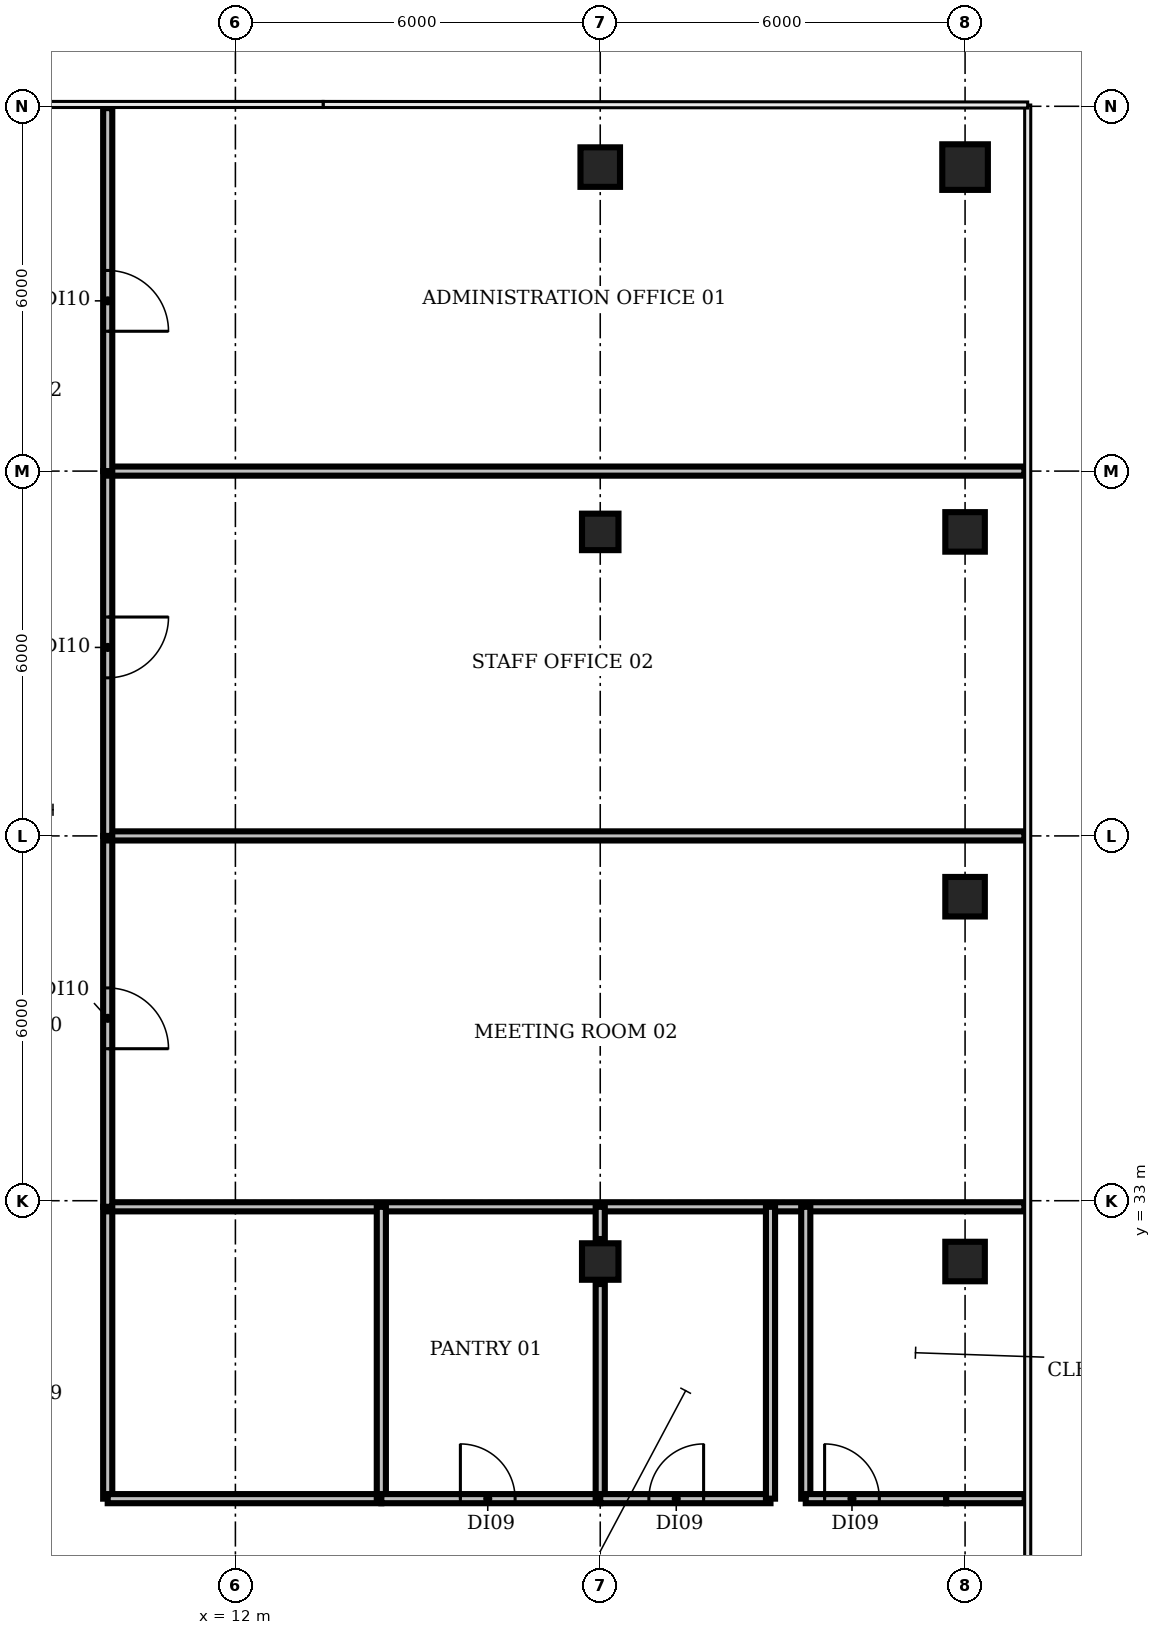
"""IFC4 building model, lengths in metres.
Left out: names, types, materials, properties, quantities, classifications, styles, units other than length and angle.
Written with IfcOpenShell. Run it as: python <this file> out.ifc"""

import sys

from ifc_helpers import new_model, si_unit, direction, frame, frame_2d, origin, origin_2d, place, context, subcontext, project, spatial, rectangle, circle, extrude, element, fill, save


model = new_model("IFC4")
c1 = context("Model", 3, precision=1e-05, world=origin(), true_north=direction((0.0, 1.0)))
c2 = subcontext(c1, "Body", "Model", "MODEL_VIEW")
j1 = project(units=[si_unit("LENGTHUNIT", "METRE"), si_unit("PLANEANGLEUNIT", "RADIAN")], contexts=[c1])
p1 = place(None, origin())
s1 = spatial("IfcSite", under=j1, at=p1, CompositionType="ELEMENT")
p2 = place(p1, origin())
s2 = spatial("IfcBuilding", under=s1, at=p2, CompositionType="ELEMENT")
p3 = place(p2, frame((0.0, 0.0, 323.0)))
s3 = spatial("IfcBuildingStorey", under=s2, at=p3, CompositionType="ELEMENT", Elevation=323.0)
for number, where, z_axis, x_axis in (
    (1, (18.0, 32.0, 0.0), (0.0, 0.0, 1.0), (1.0, 0.0, 0.0)),
    (2, (18.0, 44.0, 0.0), (0.0, 0.0, 1.0), (1.0, 0.0, 0.0)),
):
    element("IfcColumn", number, at=place(p3, frame(where, z_axis=z_axis, x_axis=x_axis)), inside=s3, PredefinedType="COLUMN", context=c2, shape_type="SweptSolid", body=[
        extrude(rectangle(XDim=0.6, YDim=0.6, at=origin_2d()), origin(), (0.0, 0.0, 1.0), 3.9),
    ])
for number, where, z_axis, x_axis in (
    (3, (18.0, 50.0, 0.0), (0.0, 0.0, 1.0), (1.0, 0.0, 0.0)),
    (4, (24.0, 32.0, 0.0), (0.0, 0.0, 1.0), (1.0, 0.0, 0.0)),
    (5, (24.0, 38.0, 0.0), (0.0, 0.0, 1.0), (1.0, 0.0, 0.0)),
    (6, (24.0, 44.0, 0.0), (0.0, 0.0, 1.0), (1.0, 0.0, 0.0)),
):
    element("IfcColumn", number, at=place(p3, frame(where, z_axis=z_axis, x_axis=x_axis)), inside=s3, PredefinedType="COLUMN", context=c2, shape_type="SweptSolid", body=[
        extrude(rectangle(XDim=0.65, YDim=0.65, at=origin_2d()), origin(), (0.0, 0.0, 1.0), 3.9),
    ])
p4 = place(p3, frame((24.0, 50.0, 0.0), z_axis=(0.0, 0.0, 1.0), x_axis=(1.0, 0.0, 0.0)))
e7 = element("IfcColumn", 7, at=p4, inside=s3, PredefinedType="COLUMN", context=c2, shape_type="SweptSolid", body=[
    extrude(circle(Radius=0.375, at=origin_2d()), origin(), (0.0, 0.0, 1.0), 3.9),
])
p5 = place(p3, frame((9.9, 28.1, 0.0), z_axis=(0.0, 0.0, 1.0), x_axis=(0.0, 1.0, 0.0)))
e8 = element("IfcWall", 8, at=p5, inside=s3, PredefinedType="PARTITIONING", context=c2, shape_type="SweptSolid", body=[
    extrude(rectangle(XDim=4.8, YDim=0.15, at=frame_2d((2.4, 0.0))), origin(), (0.0, 0.0, 1.0), 2.48),
])
p6 = place(p3, frame((9.9, 28.1, 0.0), z_axis=(0.0, 0.0, 1.0), x_axis=(1.0, 0.0, 0.0)))
e9 = element("IfcWall", 9, at=p6, inside=s3, PredefinedType="PARTITIONING", context=c2, shape_type="SweptSolid", body=[
    extrude(rectangle(XDim=4.5, YDim=0.15, at=frame_2d((2.25, 0.0))), origin(), (0.0, 0.0, 1.0), 2.48),
])
p7 = place(p3, frame((9.9, 32.9, 0.0), z_axis=(0.0, 0.0, 1.0), x_axis=(1.0, 0.0, 0.0)))
e10 = element("IfcWall", 10, at=p7, inside=s3, PredefinedType="PARTITIONING", context=c2, shape_type="SweptSolid", body=[
    extrude(rectangle(XDim=15.075, YDim=0.15, at=frame_2d((7.538, 0.0))), origin(), (0.0, 0.0, 1.0), 2.48),
])
p8 = place(p3, frame((9.9, 39.0, 0.0), z_axis=(0.0, 0.0, 1.0), x_axis=(0.0, -1.0, 0.0)))
e11 = element("IfcWall", 11, at=p8, inside=s3, PredefinedType="PARTITIONING", context=c2, shape_type="SweptSolid", body=[
    extrude(rectangle(XDim=6.1, YDim=0.15, at=frame_2d((3.05, 0.0))), origin(), (0.0, 0.0, 1.0), 2.48),
])
p9 = place(p8, frame((2.5, 0.0, 0.0)))
e12 = element("IfcOpeningElement", 12, at=p9, cuts=e11, PredefinedType="OPENING", context=c2, shape_type="SweptSolid", body=[
    extrude(rectangle(XDim=1.0, YDim=2.1, at=frame_2d((0.5, 1.05))), frame((0.0, 0.085, 0.0), z_axis=(0.0, -1.0, 0.0), x_axis=(1.0, 0.0, 0.0)), (0.0, 0.0, 1.0), 0.17),
])
p10 = place(p3, frame((9.9, 39.0, 0.0), z_axis=(0.0, 0.0, 1.0), x_axis=(1.0, 0.0, 0.0)))
e13 = element("IfcWall", 13, at=p10, inside=s3, PredefinedType="PARTITIONING", context=c2, shape_type="SweptSolid", body=[
    extrude(rectangle(XDim=15.075, YDim=0.15, at=frame_2d((7.538, 0.0))), origin(), (0.0, 0.0, 1.0), 2.48),
])
p11 = place(p3, frame((9.9, 45.0, 0.0), z_axis=(0.0, 0.0, 1.0), x_axis=(0.0, -1.0, 0.0)))
e14 = element("IfcWall", 14, at=p11, inside=s3, PredefinedType="PARTITIONING", context=c2, shape_type="SweptSolid", body=[
    extrude(rectangle(XDim=6.0, YDim=0.15, at=frame_2d((3.0, 0.0))), origin(), (0.0, 0.0, 1.0), 2.48),
])
p12 = place(p11, frame((2.4, 0.0, 0.0)))
e15 = element("IfcOpeningElement", 15, at=p12, cuts=e14, PredefinedType="OPENING", context=c2, shape_type="SweptSolid", body=[
    extrude(rectangle(XDim=1.0, YDim=2.1, at=frame_2d((0.5, 1.05))), frame((0.0, 0.085, 0.0), z_axis=(0.0, -1.0, 0.0), x_axis=(1.0, 0.0, 0.0)), (0.0, 0.0, 1.0), 0.17),
])
p13 = place(p3, frame((9.9, 45.0, 0.0), z_axis=(0.0, 0.0, 1.0), x_axis=(1.0, 0.0, 0.0)))
e16 = element("IfcWall", 16, at=p13, inside=s3, PredefinedType="PARTITIONING", context=c2, shape_type="SweptSolid", body=[
    extrude(rectangle(XDim=15.075, YDim=0.15, at=frame_2d((7.538, 0.0))), origin(), (0.0, 0.0, 1.0), 2.48),
])
p14 = place(p3, frame((9.9, 50.97, 0.0), z_axis=(0.0, 0.0, 1.0), x_axis=(0.0, -1.0, 0.0)))
e17 = element("IfcWall", 17, at=p14, inside=s3, PredefinedType="PARTITIONING", context=c2, shape_type="SweptSolid", body=[
    extrude(rectangle(XDim=5.97, YDim=0.15, at=frame_2d((2.985, 0.0))), origin(), (0.0, 0.0, 1.0), 2.48),
])
p15 = place(p14, frame((2.67, 0.0, 0.0)))
e18 = element("IfcOpeningElement", 18, at=p15, cuts=e17, PredefinedType="OPENING", context=c2, shape_type="SweptSolid", body=[
    extrude(rectangle(XDim=1.0, YDim=2.1, at=frame_2d((0.5, 1.05))), frame((0.0, 0.085, 0.0), z_axis=(0.0, -1.0, 0.0), x_axis=(1.0, 0.0, 0.0)), (0.0, 0.0, 1.0), 0.17),
])
p16 = place(p3, frame((14.4, 28.1, 0.0), z_axis=(0.0, 0.0, 1.0), x_axis=(0.0, 1.0, 0.0)))
e19 = element("IfcWall", 19, at=p16, inside=s3, PredefinedType="PARTITIONING", context=c2, shape_type="SweptSolid", body=[
    extrude(rectangle(XDim=4.8, YDim=0.15, at=frame_2d((2.4, 0.0))), origin(), (0.0, 0.0, 1.0), 2.48),
])
p17 = place(p3, frame((14.4, 28.1, 0.0), z_axis=(0.0, 0.0, 1.0), x_axis=(1.0, 0.0, 0.0)))
e20 = element("IfcWall", 20, at=p17, inside=s3, PredefinedType="PARTITIONING", context=c2, shape_type="SweptSolid", body=[
    extrude(rectangle(XDim=3.6, YDim=0.15, at=frame_2d((1.8, 0.0))), origin(), (0.0, 0.0, 1.0), 2.48),
])
p18 = place(p17, frame((1.3, 0.0, 0.0)))
e21 = element("IfcOpeningElement", 21, at=p18, cuts=e20, PredefinedType="OPENING", context=c2, shape_type="SweptSolid", body=[
    extrude(rectangle(XDim=0.9, YDim=2.1, at=frame_2d((0.45, 1.05))), frame((0.0, 0.085, 0.0), z_axis=(0.0, -1.0, 0.0), x_axis=(1.0, 0.0, 0.0)), (0.0, 0.0, 1.0), 0.17),
])
p19 = place(p3, frame((18.0, 28.1, 0.0), z_axis=(0.0, 0.0, 1.0), x_axis=(0.0, 1.0, 0.0)))
e22 = element("IfcWall", 22, at=p19, inside=s3, PredefinedType="PARTITIONING", context=c2, shape_type="SweptSolid", body=[
    extrude(rectangle(XDim=3.53, YDim=0.15, at=frame_2d((1.765, 0.0))), origin(), (0.0, 0.0, 1.0), 2.48),
])
p20 = place(p3, frame((18.0, 28.1, 0.0), z_axis=(0.0, 0.0, 1.0), x_axis=(1.0, 0.0, 0.0)))
e23 = element("IfcWall", 23, at=p20, inside=s3, PredefinedType="PARTITIONING", context=c2, shape_type="SweptSolid", body=[
    extrude(rectangle(XDim=2.8, YDim=0.15, at=frame_2d((1.4, 0.0))), origin(), (0.0, 0.0, 1.0), 2.48),
])
p21 = place(p20, frame((0.8, 0.0, 0.0)))
e24 = element("IfcOpeningElement", 24, at=p21, cuts=e23, PredefinedType="OPENING", context=c2, shape_type="SweptSolid", body=[
    extrude(rectangle(XDim=0.9, YDim=2.1, at=frame_2d((0.45, 1.05))), frame((0.0, 0.085, 0.0), z_axis=(0.0, -1.0, 0.0), x_axis=(1.0, 0.0, 0.0)), (0.0, 0.0, 1.0), 0.17),
])
p22 = place(p3, frame((18.0, 31.736, 0.0), z_axis=(0.0, 0.0, 1.0), x_axis=(0.0, 1.0, 0.0)))
e25 = element("IfcWall", 25, at=p22, inside=s3, PredefinedType="PARTITIONING", context=c2, shape_type="SweptSolid", body=[
    extrude(rectangle(XDim=0.529, YDim=0.15, at=frame_2d((0.264, 0.0))), origin(), (0.0, 0.0, 1.0), 2.48),
])
p23 = place(p3, frame((18.0, 32.37, 0.0), z_axis=(0.0, 0.0, 1.0), x_axis=(0.0, 1.0, 0.0)))
e26 = element("IfcWall", 26, at=p23, inside=s3, PredefinedType="PARTITIONING", context=c2, shape_type="SweptSolid", body=[
    extrude(rectangle(XDim=0.53, YDim=0.15, at=frame_2d((0.265, 0.0))), origin(), (0.0, 0.0, 1.0), 2.48),
])
for number, where, z_axis, x_axis in (
    (27, (20.8, 28.1, 0.0), (0.0, 0.0, 1.0), (0.0, 1.0, 0.0)),
    (28, (21.38, 28.1, 0.0), (0.0, 0.0, 1.0), (0.0, 1.0, 0.0)),
):
    element("IfcWall", number, at=place(p3, frame(where, z_axis=z_axis, x_axis=x_axis)), inside=s3, PredefinedType="PARTITIONING", context=c2, shape_type="SweptSolid", body=[
        extrude(rectangle(XDim=4.8, YDim=0.15, at=frame_2d((2.4, 0.0))), origin(), (0.0, 0.0, 1.0), 2.48),
    ])
p24 = place(p3, frame((21.38, 28.1, 0.0), z_axis=(0.0, 0.0, 1.0), x_axis=(1.0, 0.0, 0.0)))
e29 = element("IfcWall", 29, at=p24, inside=s3, PredefinedType="PARTITIONING", context=c2, shape_type="SweptSolid", body=[
    extrude(rectangle(XDim=2.31, YDim=0.15, at=frame_2d((1.155, 0.0))), origin(), (0.0, 0.0, 1.0), 2.48),
])
p25 = place(p24, frame((0.31, 0.0, 0.0)))
e30 = element("IfcOpeningElement", 30, at=p25, cuts=e29, PredefinedType="OPENING", context=c2, shape_type="SweptSolid", body=[
    extrude(rectangle(XDim=0.9, YDim=2.1, at=frame_2d((0.45, 1.05))), frame((0.0, 0.085, 0.0), z_axis=(0.0, -1.0, 0.0), x_axis=(1.0, 0.0, 0.0)), (0.0, 0.0, 1.0), 0.17),
])
p26 = place(p3, frame((23.69, 28.1, 0.0), z_axis=(0.0, 0.0, 1.0), x_axis=(1.0, 0.0, 0.0)))
e31 = element("IfcWall", 31, at=p26, inside=s3, PredefinedType="PARTITIONING", context=c2, shape_type="SweptSolid", body=[
    extrude(rectangle(XDim=1.29, YDim=0.15, at=frame_2d((0.645, 0.0))), origin(), (0.0, 0.0, 1.0), 2.48),
])
p27 = place(p9, origin())
e32 = element("IfcDoor", 32, at=p27, inside=s3, OperationType="SINGLE_SWING_RIGHT", PredefinedType="DOOR", context=c2, shape_type="SweptSolid", body=[
    extrude(rectangle(XDim=1.0, YDim=2.1, at=frame_2d((0.5, 1.05))), frame((0.0, 0.025, 0.0), z_axis=(0.0, -1.0, 0.0), x_axis=(1.0, 0.0, 0.0)), (0.0, 0.0, 1.0), 0.05),
])
fill(e12, e32)
p28 = place(p12, origin())
e33 = element("IfcDoor", 33, at=p28, inside=s3, OperationType="SINGLE_SWING_LEFT", PredefinedType="DOOR", context=c2, shape_type="SweptSolid", body=[
    extrude(rectangle(XDim=1.0, YDim=2.1, at=frame_2d((0.5, 1.05))), frame((0.0, 0.025, 0.0), z_axis=(0.0, -1.0, 0.0), x_axis=(1.0, 0.0, 0.0)), (0.0, 0.0, 1.0), 0.05),
])
fill(e15, e33)
p29 = place(p15, origin())
e34 = element("IfcDoor", 34, at=p29, inside=s3, OperationType="SINGLE_SWING_RIGHT", PredefinedType="DOOR", context=c2, shape_type="SweptSolid", body=[
    extrude(rectangle(XDim=1.0, YDim=2.1, at=frame_2d((0.5, 1.05))), frame((0.0, 0.025, 0.0), z_axis=(0.0, -1.0, 0.0), x_axis=(1.0, 0.0, 0.0)), (0.0, 0.0, 1.0), 0.05),
])
fill(e18, e34)
p30 = place(p18, origin())
e35 = element("IfcDoor", 35, at=p30, inside=s3, OperationType="SINGLE_SWING_LEFT", PredefinedType="DOOR", context=c2, shape_type="SweptSolid", body=[
    extrude(rectangle(XDim=0.9, YDim=2.1, at=frame_2d((0.45, 1.05))), frame((0.0, 0.025, 0.0), z_axis=(0.0, -1.0, 0.0), x_axis=(1.0, 0.0, 0.0)), (0.0, 0.0, 1.0), 0.05),
])
fill(e21, e35)
p31 = place(p21, origin())
e36 = element("IfcDoor", 36, at=p31, inside=s3, OperationType="SINGLE_SWING_RIGHT", PredefinedType="DOOR", context=c2, shape_type="SweptSolid", body=[
    extrude(rectangle(XDim=0.9, YDim=2.1, at=frame_2d((0.45, 1.05))), frame((0.0, 0.025, 0.0), z_axis=(0.0, -1.0, 0.0), x_axis=(1.0, 0.0, 0.0)), (0.0, 0.0, 1.0), 0.05),
])
fill(e24, e36)
p32 = place(p25, origin())
e37 = element("IfcDoor", 37, at=p32, inside=s3, OperationType="SINGLE_SWING_LEFT", PredefinedType="DOOR", context=c2, shape_type="SweptSolid", body=[
    extrude(rectangle(XDim=0.9, YDim=2.1, at=frame_2d((0.45, 1.05))), frame((0.0, 0.025, 0.0), z_axis=(0.0, -1.0, 0.0), x_axis=(1.0, 0.0, 0.0)), (0.0, 0.0, 1.0), 0.05),
])
fill(e30, e37)
save(model, sys.argv[1])
